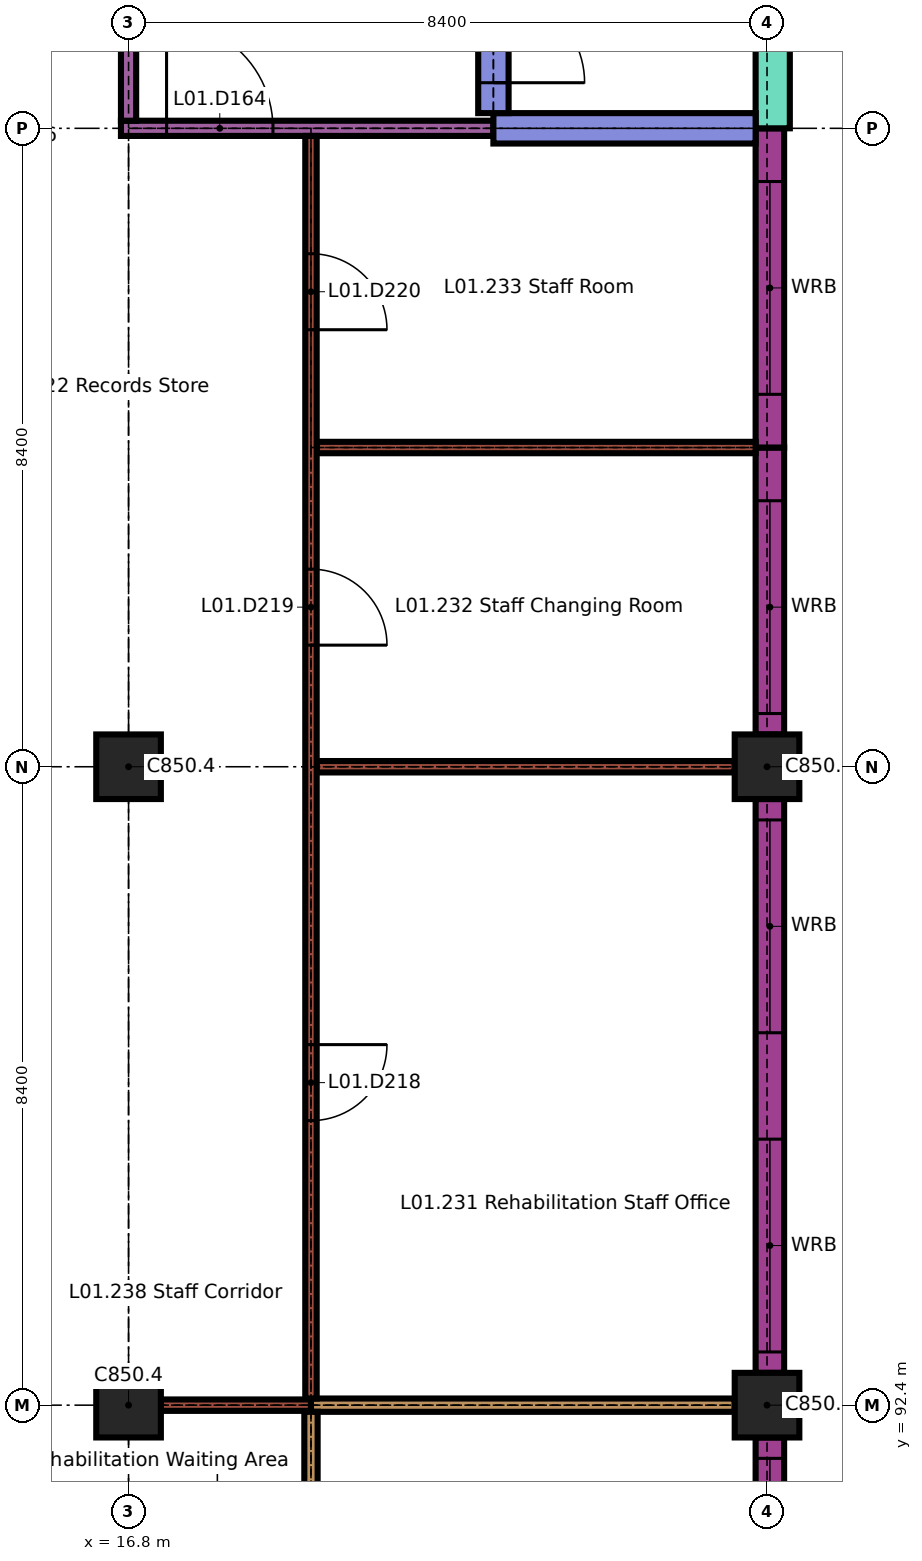
"""IFC4 building model, lengths in metres.
Left out: names, types, materials, properties, quantities, classifications, styles, units other than length and angle.
Written with IfcOpenShell. Run it as: python <this file> out.ifc"""

import sys

from ifc_helpers import new_model, si_unit, direction, frame, frame_2d, origin, origin_2d, place, context, subcontext, project, spatial, rectangle, extrude, element, fill, save


model = new_model("IFC4")
c1 = context("Model", 3, precision=1e-05, world=origin(), true_north=direction((0.0, 1.0)))
c2 = subcontext(c1, "Body", "Model", "MODEL_VIEW")
j1 = project(units=[si_unit("LENGTHUNIT", "METRE"), si_unit("PLANEANGLEUNIT", "RADIAN")], contexts=[c1])
p1 = place(None, origin())
s1 = spatial("IfcSite", under=j1, at=p1, CompositionType="ELEMENT")
p2 = place(p1, origin())
s2 = spatial("IfcBuilding", under=s1, at=p2, CompositionType="ELEMENT")
p3 = place(p2, frame((0.0, 0.0, 4.5)))
s3 = spatial("IfcBuildingStorey", under=s2, at=p3, CompositionType="ELEMENT", Elevation=4.5)
for number, where, z_axis, x_axis in (
    (1, (16.8, 92.4, 0.0), (0.0, 0.0, 1.0), (1.0, 0.0, 0.0)),
    (2, (25.2, 92.4, 0.0), (0.0, 0.0, 1.0), (1.0, 0.0, 0.0)),
    (3, (16.8, 100.8, 0.0), (0.0, 0.0, 1.0), (1.0, 0.0, 0.0)),
    (4, (25.2, 100.8, 0.0), (0.0, 0.0, 1.0), (1.0, 0.0, 0.0)),
):
    element("IfcColumn", number, at=place(p3, frame(where, z_axis=z_axis, x_axis=x_axis)), inside=s3, PredefinedType="COLUMN", context=c2, shape_type="SweptSolid", body=[
        extrude(rectangle(XDim=0.85, YDim=0.85, at=origin_2d()), origin(), (0.0, 0.0, 1.0), 3.45),
    ])
p4 = place(p3, frame((25.238, 84.0, 0.0), z_axis=(0.0, 0.0, 1.0), x_axis=(0.0, 1.0, 0.0)))
e5 = element("IfcWall", 5, at=p4, inside=s3, PredefinedType="SOLIDWALL", context=c2, shape_type="SweptSolid", body=[
    extrude(rectangle(XDim=7.975, YDim=0.375, at=frame_2d((3.988, 0.0))), origin(), (0.0, 0.0, 1.0), 3.15),
])
p5 = place(p4, frame((0.7, 0.0, 1.0)))
e6 = element("IfcOpeningElement", 6, at=p5, cuts=e5, PredefinedType="OPENING", context=c2, shape_type="SweptSolid", body=[
    extrude(rectangle(XDim=2.8, YDim=1.2, at=frame_2d((1.4, 0.6))), frame((0.0, 0.198, 0.0), z_axis=(0.0, -1.0, 0.0), x_axis=(1.0, 0.0, 0.0)), (0.0, 0.0, 1.0), 0.395),
])
p6 = place(p4, frame((4.9, 0.0, 1.0)))
e7 = element("IfcOpeningElement", 7, at=p6, cuts=e5, PredefinedType="OPENING", context=c2, shape_type="SweptSolid", body=[
    extrude(rectangle(XDim=2.8, YDim=1.2, at=frame_2d((1.4, 0.6))), frame((0.0, 0.198, 0.0), z_axis=(0.0, -1.0, 0.0), x_axis=(1.0, 0.0, 0.0)), (0.0, 0.0, 1.0), 0.395),
])
p7 = place(p3, frame((25.238, 92.825, 0.0), z_axis=(0.0, 0.0, 1.0), x_axis=(0.0, 1.0, 0.0)))
e8 = element("IfcWall", 8, at=p7, inside=s3, PredefinedType="SOLIDWALL", context=c2, shape_type="SweptSolid", body=[
    extrude(rectangle(XDim=7.55, YDim=0.375, at=frame_2d((3.775, 0.0))), origin(), (0.0, 0.0, 1.0), 3.15),
])
p8 = place(p7, frame((0.275, 0.0, 1.0)))
e9 = element("IfcOpeningElement", 9, at=p8, cuts=e8, PredefinedType="OPENING", context=c2, shape_type="SweptSolid", body=[
    extrude(rectangle(XDim=2.8, YDim=1.2, at=frame_2d((1.4, 0.6))), frame((0.0, 0.198, 0.0), z_axis=(0.0, -1.0, 0.0), x_axis=(1.0, 0.0, 0.0)), (0.0, 0.0, 1.0), 0.395),
])
p9 = place(p7, frame((4.475, 0.0, 1.0)))
e10 = element("IfcOpeningElement", 10, at=p9, cuts=e8, PredefinedType="OPENING", context=c2, shape_type="SweptSolid", body=[
    extrude(rectangle(XDim=2.8, YDim=1.2, at=frame_2d((1.4, 0.6))), frame((0.0, 0.198, 0.0), z_axis=(0.0, -1.0, 0.0), x_axis=(1.0, 0.0, 0.0)), (0.0, 0.0, 1.0), 0.395),
])
p10 = place(p3, frame((25.238, 101.225, 0.0), z_axis=(0.0, 0.0, 1.0), x_axis=(0.0, 1.0, 0.0)))
e11 = element("IfcWall", 11, at=p10, inside=s3, PredefinedType="SOLIDWALL", context=c2, shape_type="SweptSolid", body=[
    extrude(rectangle(XDim=3.775, YDim=0.375, at=frame_2d((1.887, 0.0))), origin(), (0.0, 0.0, 1.0), 3.15),
])
p11 = place(p10, frame((0.275, 0.0, 1.0)))
e12 = element("IfcOpeningElement", 12, at=p11, cuts=e11, PredefinedType="OPENING", context=c2, shape_type="SweptSolid", body=[
    extrude(rectangle(XDim=2.8, YDim=1.2, at=frame_2d((1.4, 0.6))), frame((0.0, 0.198, 0.0), z_axis=(0.0, -1.0, 0.0), x_axis=(1.0, 0.0, 0.0)), (0.0, 0.0, 1.0), 0.395),
])
p12 = place(p3, frame((25.238, 105.0, 0.0), z_axis=(0.0, 0.0, 1.0), x_axis=(0.0, 1.0, 0.0)))
e13 = element("IfcWall", 13, at=p12, inside=s3, PredefinedType="SOLIDWALL", context=c2, shape_type="SweptSolid", body=[
    extrude(rectangle(XDim=4.2, YDim=0.375, at=frame_2d((2.1, 0.0))), origin(), (0.0, 0.0, 1.0), 3.15),
])
p13 = place(p12, frame((0.7, 0.0, 1.0)))
e14 = element("IfcOpeningElement", 14, at=p13, cuts=e13, PredefinedType="OPENING", context=c2, shape_type="SweptSolid", body=[
    extrude(rectangle(XDim=2.8, YDim=1.2, at=frame_2d((1.4, 0.6))), frame((0.0, 0.198, 0.0), z_axis=(0.0, -1.0, 0.0), x_axis=(1.0, 0.0, 0.0)), (0.0, 0.0, 1.0), 0.395),
])
p14 = place(p3, frame((25.275, 109.2, 0.0), z_axis=(0.0, 0.0, 1.0), x_axis=(0.0, 1.0, 0.0)))
e15 = element("IfcWall", 15, at=p14, inside=s3, PredefinedType="SOLIDWALL", context=c2, shape_type="SweptSolid", body=[
    extrude(rectangle(XDim=3.15, YDim=0.45, at=frame_2d((1.575, 0.0))), origin(), (0.0, 0.0, 1.0), 3.45),
])
p15 = place(p3, frame((17.225, 92.4, 0.0), z_axis=(0.0, 0.0, 1.0), x_axis=(1.0, 0.0, 0.0)))
e16 = element("IfcWall", 16, at=p15, inside=s3, PredefinedType="PARTITIONING", context=c2, shape_type="SweptSolid", body=[
    extrude(rectangle(XDim=1.975, YDim=0.15, at=frame_2d((0.987, 0.0))), origin(), (0.0, 0.0, 1.0), 3.45),
])
p16 = place(p3, frame((19.2, 92.4, 0.0), z_axis=(0.0, 0.0, 1.0), x_axis=(1.0, 0.0, 0.0)))
e17 = element("IfcWall", 17, at=p16, inside=s3, PredefinedType="PARTITIONING", context=c2, shape_type="SweptSolid", body=[
    extrude(rectangle(XDim=5.575, YDim=0.175, at=frame_2d((2.788, 0.0))), origin(), (0.0, 0.0, 1.0), 3.45),
])
p17 = place(p3, frame((19.275, 100.8, 0.0), z_axis=(0.0, 0.0, 1.0), x_axis=(1.0, 0.0, 0.0)))
e18 = element("IfcWall", 18, at=p17, inside=s3, PredefinedType="PARTITIONING", context=c2, shape_type="SweptSolid", body=[
    extrude(rectangle(XDim=5.5, YDim=0.15, at=frame_2d((2.75, 0.0))), origin(), (0.0, 0.0, 1.0), 3.45),
])
p18 = place(p3, frame((19.275, 105.0, 0.0), z_axis=(0.0, 0.0, 1.0), x_axis=(1.0, 0.0, 0.0)))
e19 = element("IfcWall", 19, at=p18, inside=s3, PredefinedType="PARTITIONING", context=c2, shape_type="SweptSolid", body=[
    extrude(rectangle(XDim=5.775, YDim=0.15, at=frame_2d((2.888, 0.0))), origin(), (0.0, 0.0, 1.0), 3.45),
])
p19 = place(p3, frame((16.7, 109.2, 0.0), z_axis=(0.0, 0.0, 1.0), x_axis=(1.0, 0.0, 0.0)))
e20 = element("IfcWall", 20, at=p19, inside=s3, PredefinedType="PARTITIONING", context=c2, shape_type="SweptSolid", body=[
    extrude(rectangle(XDim=4.9, YDim=0.2, at=frame_2d((2.45, 0.0))), origin(), (0.0, 0.0, 1.0), 3.45),
])
p20 = place(p19, frame((0.6, 0.0, 0.0)))
e21 = element("IfcOpeningElement", 21, at=p20, cuts=e20, PredefinedType="OPENING", context=c2, shape_type="SweptSolid", body=[
    extrude(rectangle(XDim=1.4, YDim=2.1, at=frame_2d((0.7, 1.05))), frame((0.0, 0.11, 0.0), z_axis=(0.0, -1.0, 0.0), x_axis=(1.0, 0.0, 0.0)), (0.0, 0.0, 1.0), 0.22),
])
p21 = place(p3, frame((21.6, 109.2, 0.0), z_axis=(0.0, 0.0, 1.0), x_axis=(1.0, 0.0, 0.0)))
e22 = element("IfcWall", 22, at=p21, inside=s3, PredefinedType="SHEAR", context=c2, shape_type="SweptSolid", body=[
    extrude(rectangle(XDim=3.45, YDim=0.4, at=frame_2d((1.725, 0.0))), origin(), (0.0, 0.0, 1.0), 3.45),
])
p22 = place(p3, frame((16.8, 109.3, 0.0), z_axis=(0.0, 0.0, 1.0), x_axis=(0.0, 1.0, 0.0)))
e23 = element("IfcWall", 23, at=p22, inside=s3, PredefinedType="PARTITIONING", context=c2, shape_type="SweptSolid", body=[
    extrude(rectangle(XDim=8.15, YDim=0.2, at=frame_2d((4.075, 0.0))), origin(), (0.0, 0.0, 1.0), 3.45),
])
p23 = place(p22, frame((3.375, 0.0, 0.0)))
e24 = element("IfcOpeningElement", 24, at=p23, cuts=e23, PredefinedType="OPENING", context=c2, shape_type="SweptSolid", body=[
    extrude(rectangle(XDim=1.4, YDim=2.1, at=frame_2d((0.7, 1.05))), frame((0.0, 0.11, 0.0), z_axis=(0.0, -1.0, 0.0), x_axis=(1.0, 0.0, 0.0)), (0.0, 0.0, 1.0), 0.22),
])
p24 = place(p3, frame((19.2, 84.1, 0.0), z_axis=(0.0, 0.0, 1.0), x_axis=(0.0, 1.0, 0.0)))
e25 = element("IfcWall", 25, at=p24, inside=s3, PredefinedType="PARTITIONING", context=c2, shape_type="SweptSolid", body=[
    extrude(rectangle(XDim=8.212, YDim=0.175, at=frame_2d((4.106, 0.0))), origin(), (0.0, 0.0, 1.0), 3.45),
])
p25 = place(p24, frame((3.606, 0.0, 0.0)))
e26 = element("IfcOpeningElement", 26, at=p25, cuts=e25, PredefinedType="OPENING", context=c2, shape_type="SweptSolid", body=[
    extrude(rectangle(XDim=1.0, YDim=2.1, at=frame_2d((0.5, 1.05))), frame((0.0, 0.097, 0.0), z_axis=(0.0, -1.0, 0.0), x_axis=(1.0, 0.0, 0.0)), (0.0, 0.0, 1.0), 0.195),
])
p26 = place(p3, frame((19.2, 92.488, 0.0), z_axis=(0.0, 0.0, 1.0), x_axis=(0.0, 1.0, 0.0)))
e27 = element("IfcWall", 27, at=p26, inside=s3, PredefinedType="PARTITIONING", context=c2, shape_type="SweptSolid", body=[
    extrude(rectangle(XDim=16.613, YDim=0.15, at=frame_2d((8.306, 0.0))), origin(), (0.0, 0.0, 1.0), 3.45),
])
p27 = place(p26, frame((3.656, 0.0, 0.0)))
e28 = element("IfcOpeningElement", 28, at=p27, cuts=e27, PredefinedType="OPENING", context=c2, shape_type="SweptSolid", body=[
    extrude(rectangle(XDim=1.0, YDim=2.1, at=frame_2d((0.5, 1.05))), frame((0.0, 0.085, 0.0), z_axis=(0.0, -1.0, 0.0), x_axis=(1.0, 0.0, 0.0)), (0.0, 0.0, 1.0), 0.17),
])
p28 = place(p26, frame((9.913, 0.0, 0.0)))
e29 = element("IfcOpeningElement", 29, at=p28, cuts=e27, PredefinedType="OPENING", context=c2, shape_type="SweptSolid", body=[
    extrude(rectangle(XDim=1.0, YDim=2.1, at=frame_2d((0.5, 1.05))), frame((0.0, 0.085, 0.0), z_axis=(0.0, -1.0, 0.0), x_axis=(1.0, 0.0, 0.0)), (0.0, 0.0, 1.0), 0.17),
])
p29 = place(p26, frame((14.062, 0.0, 0.0)))
e30 = element("IfcOpeningElement", 30, at=p29, cuts=e27, PredefinedType="OPENING", context=c2, shape_type="SweptSolid", body=[
    extrude(rectangle(XDim=1.0, YDim=2.1, at=frame_2d((0.5, 1.05))), frame((0.0, 0.085, 0.0), z_axis=(0.0, -1.0, 0.0), x_axis=(1.0, 0.0, 0.0)), (0.0, 0.0, 1.0), 0.17),
])
p30 = place(p3, frame((21.6, 109.4, 0.0), z_axis=(0.0, 0.0, 1.0), x_axis=(0.0, 1.0, 0.0)))
e31 = element("IfcWall", 31, at=p30, inside=s3, PredefinedType="SHEAR", context=c2, shape_type="SweptSolid", body=[
    extrude(rectangle(XDim=8.05, YDim=0.4, at=frame_2d((4.025, 0.0))), origin(), (0.0, 0.0, 1.0), 3.45),
])
p31 = place(p30, frame((0.4, 0.0, 0.0)))
e32 = element("IfcOpeningElement", 32, at=p31, cuts=e31, PredefinedType="OPENING", context=c2, shape_type="SweptSolid", body=[
    extrude(rectangle(XDim=1.2, YDim=2.1, at=frame_2d((0.6, 1.05))), frame((0.0, 0.21, 0.0), z_axis=(0.0, -1.0, 0.0), x_axis=(1.0, 0.0, 0.0)), (0.0, 0.0, 1.0), 0.42),
])
p32 = place(p6, origin())
e33 = element("IfcWindow", 33, at=p32, inside=s3, PartitioningType="DOUBLE_PANEL_VERTICAL", PredefinedType="WINDOW", context=c2, shape_type="SweptSolid", body=[
    extrude(rectangle(XDim=2.8, YDim=1.2, at=frame_2d((1.4, 0.6))), frame((0.0, 0.03, 0.0), z_axis=(0.0, -1.0, 0.0), x_axis=(1.0, 0.0, 0.0)), (0.0, 0.0, 1.0), 0.06),
])
fill(e7, e33)
p33 = place(p8, origin())
e34 = element("IfcWindow", 34, at=p33, inside=s3, PartitioningType="DOUBLE_PANEL_VERTICAL", PredefinedType="WINDOW", context=c2, shape_type="SweptSolid", body=[
    extrude(rectangle(XDim=2.8, YDim=1.2, at=frame_2d((1.4, 0.6))), frame((0.0, 0.03, 0.0), z_axis=(0.0, -1.0, 0.0), x_axis=(1.0, 0.0, 0.0)), (0.0, 0.0, 1.0), 0.06),
])
fill(e9, e34)
p34 = place(p9, origin())
e35 = element("IfcWindow", 35, at=p34, inside=s3, PartitioningType="DOUBLE_PANEL_VERTICAL", PredefinedType="WINDOW", context=c2, shape_type="SweptSolid", body=[
    extrude(rectangle(XDim=2.8, YDim=1.2, at=frame_2d((1.4, 0.6))), frame((0.0, 0.03, 0.0), z_axis=(0.0, -1.0, 0.0), x_axis=(1.0, 0.0, 0.0)), (0.0, 0.0, 1.0), 0.06),
])
fill(e10, e35)
p35 = place(p11, origin())
e36 = element("IfcWindow", 36, at=p35, inside=s3, PartitioningType="DOUBLE_PANEL_VERTICAL", PredefinedType="WINDOW", context=c2, shape_type="SweptSolid", body=[
    extrude(rectangle(XDim=2.8, YDim=1.2, at=frame_2d((1.4, 0.6))), frame((0.0, 0.03, 0.0), z_axis=(0.0, -1.0, 0.0), x_axis=(1.0, 0.0, 0.0)), (0.0, 0.0, 1.0), 0.06),
])
fill(e12, e36)
p36 = place(p13, origin())
e37 = element("IfcWindow", 37, at=p36, inside=s3, PartitioningType="DOUBLE_PANEL_VERTICAL", PredefinedType="WINDOW", context=c2, shape_type="SweptSolid", body=[
    extrude(rectangle(XDim=2.8, YDim=1.2, at=frame_2d((1.4, 0.6))), frame((0.0, 0.03, 0.0), z_axis=(0.0, -1.0, 0.0), x_axis=(1.0, 0.0, 0.0)), (0.0, 0.0, 1.0), 0.06),
])
fill(e14, e37)
p37 = place(p20, origin())
e38 = element("IfcDoor", 38, at=p37, inside=s3, OperationType="SINGLE_SWING_RIGHT", PredefinedType="DOOR", context=c2, shape_type="SweptSolid", body=[
    extrude(rectangle(XDim=1.4, YDim=2.1, at=frame_2d((0.7, 1.05))), frame((0.0, 0.03, 0.0), z_axis=(0.0, -1.0, 0.0), x_axis=(1.0, 0.0, 0.0)), (0.0, 0.0, 1.0), 0.06),
])
fill(e21, e38)
p38 = place(p27, origin())
e39 = element("IfcDoor", 39, at=p38, inside=s3, OperationType="SINGLE_SWING_RIGHT", PredefinedType="DOOR", context=c2, shape_type="SweptSolid", body=[
    extrude(rectangle(XDim=1.0, YDim=2.1, at=frame_2d((0.5, 1.05))), frame((0.0, 0.025, 0.0), z_axis=(0.0, -1.0, 0.0), x_axis=(1.0, 0.0, 0.0)), (0.0, 0.0, 1.0), 0.05),
])
fill(e28, e39)
p39 = place(p28, origin())
e40 = element("IfcDoor", 40, at=p39, inside=s3, OperationType="SINGLE_SWING_LEFT", PredefinedType="DOOR", context=c2, shape_type="SweptSolid", body=[
    extrude(rectangle(XDim=1.0, YDim=2.1, at=frame_2d((0.5, 1.05))), frame((0.0, 0.025, 0.0), z_axis=(0.0, -1.0, 0.0), x_axis=(1.0, 0.0, 0.0)), (0.0, 0.0, 1.0), 0.05),
])
fill(e29, e40)
p40 = place(p29, origin())
e41 = element("IfcDoor", 41, at=p40, inside=s3, OperationType="SINGLE_SWING_LEFT", PredefinedType="DOOR", context=c2, shape_type="SweptSolid", body=[
    extrude(rectangle(XDim=1.0, YDim=2.1, at=frame_2d((0.5, 1.05))), frame((0.0, 0.025, 0.0), z_axis=(0.0, -1.0, 0.0), x_axis=(1.0, 0.0, 0.0)), (0.0, 0.0, 1.0), 0.05),
])
fill(e30, e41)
p41 = place(p31, origin())
e42 = element("IfcDoor", 42, at=p41, inside=s3, OperationType="SINGLE_SWING_LEFT", PredefinedType="DOOR", context=c2, shape_type="SweptSolid", body=[
    extrude(rectangle(XDim=1.2, YDim=2.1, at=frame_2d((0.6, 1.05))), frame((0.0, 0.025, 0.0), z_axis=(0.0, -1.0, 0.0), x_axis=(1.0, 0.0, 0.0)), (0.0, 0.0, 1.0), 0.05),
])
fill(e32, e42)
save(model, sys.argv[1])
